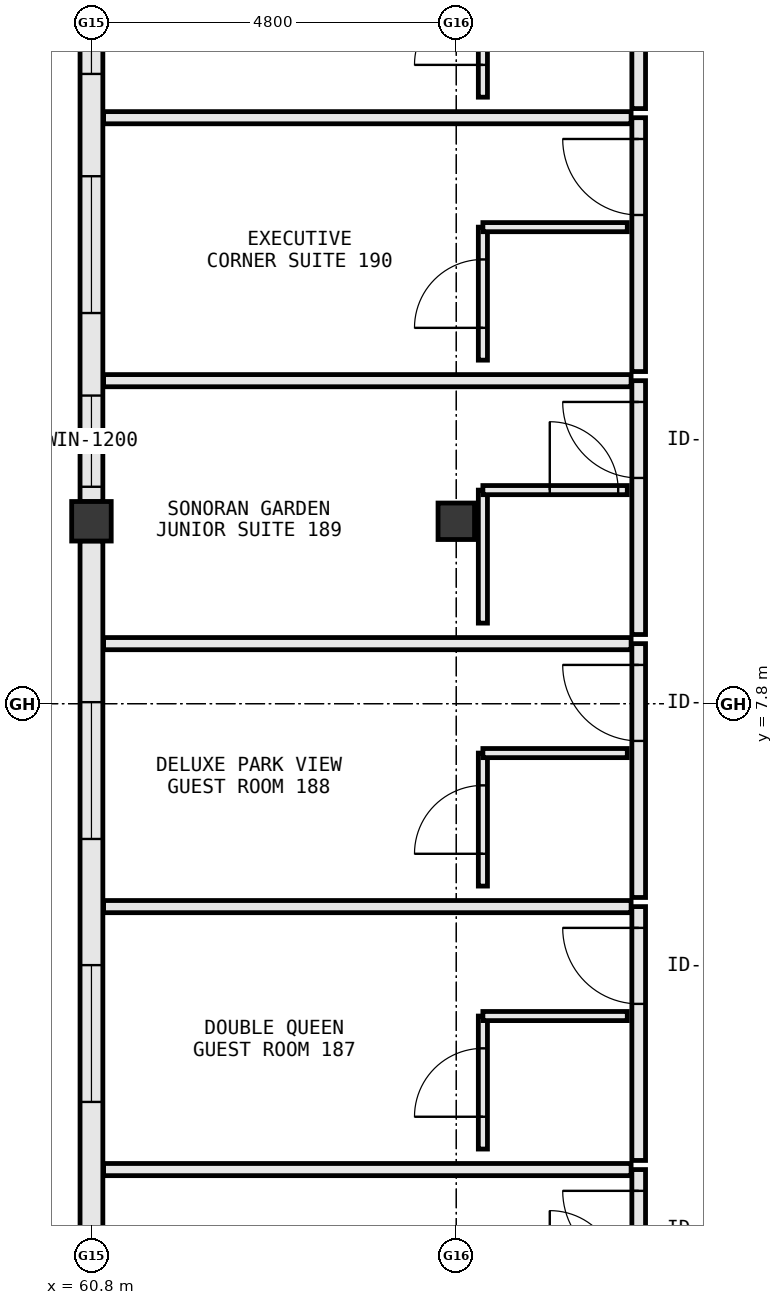
"""IFC4 building model, lengths in metres.
Left out: names, types, materials, properties, quantities, classifications, styles, units other than length and angle.
Written with IfcOpenShell. Run it as: python <this file> out.ifc"""

import sys

from ifc_helpers import new_model, si_unit, direction, frame, frame_2d, origin, origin_2d, place, context, subcontext, project, spatial, rectangle, extrude, element, fill, save


model = new_model("IFC4")
c1 = context("Model", 3, precision=1e-05, world=origin(), true_north=direction((0.0, 1.0)))
c2 = subcontext(c1, "Body", "Model", "MODEL_VIEW")
j1 = project(units=[si_unit("LENGTHUNIT", "METRE"), si_unit("PLANEANGLEUNIT", "RADIAN")], contexts=[c1])
p1 = place(None, origin())
s1 = spatial("IfcSite", under=j1, at=p1, CompositionType="ELEMENT")
p2 = place(p1, origin())
s2 = spatial("IfcBuilding", under=s1, at=p2, CompositionType="ELEMENT")
p3 = place(p2, frame((0.0, 0.0, 27.6)))
s3 = spatial("IfcBuildingStorey", under=s2, at=p3, CompositionType="ELEMENT", Elevation=27.6)
p4 = place(p3, frame((60.8, 10.2, 0.0), z_axis=(0.0, 0.0, 1.0), x_axis=(1.0, 0.0, 0.0)))
e1 = element("IfcColumn", 1, at=p4, inside=s3, PredefinedType="COLUMN", context=c2, shape_type="SweptSolid", body=[
    extrude(rectangle(XDim=0.52, YDim=0.52, at=origin_2d()), origin(), (0.0, 0.0, 1.0), 3.8),
])
p5 = place(p3, frame((65.6, 10.2, 0.0), z_axis=(0.0, 0.0, 1.0), x_axis=(1.0, 0.0, 0.0)))
e2 = element("IfcColumn", 2, at=p5, inside=s3, PredefinedType="COLUMN", context=c2, shape_type="SweptSolid", body=[
    extrude(rectangle(XDim=0.48, YDim=0.48, at=origin_2d()), origin(), (0.0, 0.0, 1.0), 3.8),
])
p6 = place(p3, frame((60.8, 18.342, 0.0), z_axis=(0.0, 0.0, 1.0), x_axis=(0.0, -1.0, 0.0)))
e3 = element("IfcWall", 3, at=p6, inside=s3, PredefinedType="STANDARD", context=c2, shape_type="SweptSolid", body=[
    extrude(rectangle(XDim=7.884, YDim=0.3, at=frame_2d((3.942, 0.0))), origin(), (0.0, 0.0, 1.0), 3.01),
])
p7 = place(p6, frame((6.488, 0.0, 0.85)))
e4 = element("IfcOpeningElement", 4, at=p7, cuts=e3, PredefinedType="OPENING", context=c2, shape_type="SweptSolid", body=[
    extrude(rectangle(XDim=1.2, YDim=1.55, at=frame_2d((0.6, 0.775))), frame((0.0, 0.162, 0.0), z_axis=(0.0, -1.0, 0.0), x_axis=(1.0, 0.0, 0.0)), (0.0, 0.0, 1.0), 0.324),
])
p8 = place(p6, frame((3.602, 0.0, 0.85)))
e5 = element("IfcOpeningElement", 5, at=p8, cuts=e3, PredefinedType="OPENING", context=c2, shape_type="SweptSolid", body=[
    extrude(rectangle(XDim=1.8, YDim=1.85, at=frame_2d((0.9, 0.925))), frame((0.0, 0.162, 0.0), z_axis=(0.0, -1.0, 0.0), x_axis=(1.0, 0.0, 0.0)), (0.0, 0.0, 1.0), 0.324),
])
p9 = place(p6, frame((0.456, 0.0, 0.85)))
e6 = element("IfcOpeningElement", 6, at=p9, cuts=e3, PredefinedType="OPENING", context=c2, shape_type="SweptSolid", body=[
    extrude(rectangle(XDim=1.8, YDim=1.85, at=frame_2d((0.9, 0.925))), frame((0.0, 0.162, 0.0), z_axis=(0.0, -1.0, 0.0), x_axis=(1.0, 0.0, 0.0)), (0.0, 0.0, 1.0), 0.324),
])
p10 = place(p3, frame((60.8, 9.942, 0.0), z_axis=(0.0, 0.0, 1.0), x_axis=(0.0, -1.0, 0.0)))
e7 = element("IfcWall", 7, at=p10, inside=s3, PredefinedType="STANDARD", context=c2, shape_type="SweptSolid", body=[
    extrude(rectangle(XDim=9.084, YDim=0.3, at=frame_2d((4.542, 0.0))), origin(), (0.0, 0.0, 1.0), 2.91),
])
p11 = place(p10, frame((5.582, 0.0, 0.85)))
e8 = element("IfcOpeningElement", 8, at=p11, cuts=e7, PredefinedType="OPENING", context=c2, shape_type="SweptSolid", body=[
    extrude(rectangle(XDim=1.8, YDim=1.85, at=frame_2d((0.9, 0.925))), frame((0.0, 0.162, 0.0), z_axis=(0.0, -1.0, 0.0), x_axis=(1.0, 0.0, 0.0)), (0.0, 0.0, 1.0), 0.324),
])
p12 = place(p10, frame((2.122, 0.0, 0.85)))
e9 = element("IfcOpeningElement", 9, at=p12, cuts=e7, PredefinedType="OPENING", context=c2, shape_type="SweptSolid", body=[
    extrude(rectangle(XDim=1.8, YDim=1.85, at=frame_2d((0.9, 0.925))), frame((0.0, 0.162, 0.0), z_axis=(0.0, -1.0, 0.0), x_axis=(1.0, 0.0, 0.0)), (0.0, 0.0, 1.0), 0.324),
])
p13 = place(p3, frame((68.0, -1.67, 0.0), z_axis=(0.0, 0.0, 1.0), x_axis=(0.0, 1.0, 0.0)))
e10 = element("IfcWall", 10, at=p13, inside=s3, PredefinedType="PARTITIONING", context=c2, shape_type="SweptSolid", body=[
    extrude(rectangle(XDim=3.34, YDim=0.18, at=frame_2d((1.67, 0.0))), origin(), (0.0, 0.0, 1.0), 3.555),
])
p14 = place(p13, frame((2.06, 0.0, 0.0)))
e11 = element("IfcOpeningElement", 11, at=p14, cuts=e10, PredefinedType="OPENING", context=c2, shape_type="SweptSolid", body=[
    extrude(rectangle(XDim=1.0, YDim=2.2, at=frame_2d((0.5, 1.1))), frame((0.0, 0.102, 0.0), z_axis=(0.0, -1.0, 0.0), x_axis=(1.0, 0.0, 0.0)), (0.0, 0.0, 1.0), 0.204),
])
p15 = place(p3, frame((60.96, 1.67, 0.0), z_axis=(0.0, 0.0, 1.0), x_axis=(1.0, 0.0, 0.0)))
e12 = element("IfcWall", 12, at=p15, inside=s3, PredefinedType="PARTITIONING", context=c2, shape_type="SweptSolid", body=[
    extrude(rectangle(XDim=6.94, YDim=0.16, at=frame_2d((3.47, 0.0))), origin(), (0.0, 0.0, 1.0), 3.555),
])
p16 = place(p3, frame((68.0, 1.79, 0.0), z_axis=(0.0, 0.0, 1.0), x_axis=(0.0, 1.0, 0.0)))
e13 = element("IfcWall", 13, at=p16, inside=s3, PredefinedType="PARTITIONING", context=c2, shape_type="SweptSolid", body=[
    extrude(rectangle(XDim=3.34, YDim=0.18, at=frame_2d((1.67, 0.0))), origin(), (0.0, 0.0, 1.0), 3.555),
])
p17 = place(p16, frame((2.06, 0.0, 0.0)))
e14 = element("IfcOpeningElement", 14, at=p17, cuts=e13, PredefinedType="OPENING", context=c2, shape_type="SweptSolid", body=[
    extrude(rectangle(XDim=1.0, YDim=2.2, at=frame_2d((0.5, 1.1))), frame((0.0, 0.102, 0.0), z_axis=(0.0, -1.0, 0.0), x_axis=(1.0, 0.0, 0.0)), (0.0, 0.0, 1.0), 0.204),
])
p18 = place(p3, frame((60.96, 5.13, 0.0), z_axis=(0.0, 0.0, 1.0), x_axis=(1.0, 0.0, 0.0)))
e15 = element("IfcWall", 15, at=p18, inside=s3, PredefinedType="PARTITIONING", context=c2, shape_type="SweptSolid", body=[
    extrude(rectangle(XDim=6.94, YDim=0.16, at=frame_2d((3.47, 0.0))), origin(), (0.0, 0.0, 1.0), 3.555),
])
p19 = place(p3, frame((65.95, 1.94, 0.0), z_axis=(0.0, 0.0, 1.0), x_axis=(0.0, 1.0, 0.0)))
e16 = element("IfcWall", 16, at=p19, inside=s3, PredefinedType="PARTITIONING", context=c2, shape_type="SweptSolid", body=[
    extrude(rectangle(XDim=1.75, YDim=0.12, at=frame_2d((0.875, 0.0))), origin(), (0.0, 0.0, 1.0), 2.91),
])
p20 = place(p19, frame((0.425, 0.0, 0.0)))
e17 = element("IfcOpeningElement", 17, at=p20, cuts=e16, PredefinedType="OPENING", context=c2, shape_type="SweptSolid", body=[
    extrude(rectangle(XDim=0.9, YDim=2.15, at=frame_2d((0.45, 1.075))), frame((0.0, 0.072, 0.0), z_axis=(0.0, -1.0, 0.0), x_axis=(1.0, 0.0, 0.0)), (0.0, 0.0, 1.0), 0.144),
])
p21 = place(p3, frame((65.95, 3.69, 0.0), z_axis=(0.0, 0.0, 1.0), x_axis=(1.0, 0.0, 0.0)))
e18 = element("IfcWall", 18, at=p21, inside=s3, PredefinedType="PARTITIONING", context=c2, shape_type="SweptSolid", body=[
    extrude(rectangle(XDim=1.9, YDim=0.12, at=frame_2d((0.95, 0.0))), origin(), (0.0, 0.0, 1.0), 3.555),
])
p22 = place(p3, frame((68.0, 5.25, 0.0), z_axis=(0.0, 0.0, 1.0), x_axis=(0.0, 1.0, 0.0)))
e19 = element("IfcWall", 19, at=p22, inside=s3, PredefinedType="PARTITIONING", context=c2, shape_type="SweptSolid", body=[
    extrude(rectangle(XDim=3.34, YDim=0.18, at=frame_2d((1.67, 0.0))), origin(), (0.0, 0.0, 1.0), 3.555),
])
p23 = place(p22, frame((2.06, 0.0, 0.0)))
e20 = element("IfcOpeningElement", 20, at=p23, cuts=e19, PredefinedType="OPENING", context=c2, shape_type="SweptSolid", body=[
    extrude(rectangle(XDim=1.0, YDim=2.2, at=frame_2d((0.5, 1.1))), frame((0.0, 0.102, 0.0), z_axis=(0.0, -1.0, 0.0), x_axis=(1.0, 0.0, 0.0)), (0.0, 0.0, 1.0), 0.204),
])
p24 = place(p3, frame((60.96, 8.59, 0.0), z_axis=(0.0, 0.0, 1.0), x_axis=(1.0, 0.0, 0.0)))
e21 = element("IfcWall", 21, at=p24, inside=s3, PredefinedType="PARTITIONING", context=c2, shape_type="SweptSolid", body=[
    extrude(rectangle(XDim=6.94, YDim=0.16, at=frame_2d((3.47, 0.0))), origin(), (0.0, 0.0, 1.0), 3.555),
])
p25 = place(p3, frame((65.95, 5.4, 0.0), z_axis=(0.0, 0.0, 1.0), x_axis=(0.0, 1.0, 0.0)))
e22 = element("IfcWall", 22, at=p25, inside=s3, PredefinedType="PARTITIONING", context=c2, shape_type="SweptSolid", body=[
    extrude(rectangle(XDim=1.75, YDim=0.12, at=frame_2d((0.875, 0.0))), origin(), (0.0, 0.0, 1.0), 2.91),
])
p26 = place(p25, frame((0.425, 0.0, 0.0)))
e23 = element("IfcOpeningElement", 23, at=p26, cuts=e22, PredefinedType="OPENING", context=c2, shape_type="SweptSolid", body=[
    extrude(rectangle(XDim=0.9, YDim=2.15, at=frame_2d((0.45, 1.075))), frame((0.0, 0.072, 0.0), z_axis=(0.0, -1.0, 0.0), x_axis=(1.0, 0.0, 0.0)), (0.0, 0.0, 1.0), 0.144),
])
p27 = place(p3, frame((65.95, 7.15, 0.0), z_axis=(0.0, 0.0, 1.0), x_axis=(1.0, 0.0, 0.0)))
e24 = element("IfcWall", 24, at=p27, inside=s3, PredefinedType="PARTITIONING", context=c2, shape_type="SweptSolid", body=[
    extrude(rectangle(XDim=1.9, YDim=0.12, at=frame_2d((0.95, 0.0))), origin(), (0.0, 0.0, 1.0), 3.555),
])
p28 = place(p3, frame((68.0, 8.71, 0.0), z_axis=(0.0, 0.0, 1.0), x_axis=(0.0, 1.0, 0.0)))
e25 = element("IfcWall", 25, at=p28, inside=s3, PredefinedType="PARTITIONING", context=c2, shape_type="SweptSolid", body=[
    extrude(rectangle(XDim=3.34, YDim=0.18, at=frame_2d((1.67, 0.0))), origin(), (0.0, 0.0, 1.0), 3.555),
])
p29 = place(p28, frame((2.06, 0.0, 0.0)))
e26 = element("IfcOpeningElement", 26, at=p29, cuts=e25, PredefinedType="OPENING", context=c2, shape_type="SweptSolid", body=[
    extrude(rectangle(XDim=1.0, YDim=2.2, at=frame_2d((0.5, 1.1))), frame((0.0, 0.102, 0.0), z_axis=(0.0, -1.0, 0.0), x_axis=(1.0, 0.0, 0.0)), (0.0, 0.0, 1.0), 0.204),
])
p30 = place(p3, frame((60.96, 12.05, 0.0), z_axis=(0.0, 0.0, 1.0), x_axis=(1.0, 0.0, 0.0)))
e27 = element("IfcWall", 27, at=p30, inside=s3, PredefinedType="PARTITIONING", context=c2, shape_type="SweptSolid", body=[
    extrude(rectangle(XDim=6.94, YDim=0.16, at=frame_2d((3.47, 0.0))), origin(), (0.0, 0.0, 1.0), 3.555),
])
p31 = place(p3, frame((65.95, 8.86, 0.0), z_axis=(0.0, 0.0, 1.0), x_axis=(0.0, 1.0, 0.0)))
e28 = element("IfcWall", 28, at=p31, inside=s3, PredefinedType="PARTITIONING", context=c2, shape_type="SweptSolid", body=[
    extrude(rectangle(XDim=1.75, YDim=0.12, at=frame_2d((0.875, 0.0))), origin(), (0.0, 0.0, 1.0), 2.91),
])
p32 = place(p3, frame((65.95, 10.61, 0.0), z_axis=(0.0, 0.0, 1.0), x_axis=(1.0, 0.0, 0.0)))
e29 = element("IfcWall", 29, at=p32, inside=s3, PredefinedType="PARTITIONING", context=c2, shape_type="SweptSolid", body=[
    extrude(rectangle(XDim=1.9, YDim=0.12, at=frame_2d((0.95, 0.0))), origin(), (0.0, 0.0, 1.0), 3.555),
])
p33 = place(p32, frame((0.88, 0.0, 0.0)))
e30 = element("IfcOpeningElement", 30, at=p33, cuts=e29, PredefinedType="OPENING", context=c2, shape_type="SweptSolid", body=[
    extrude(rectangle(XDim=0.9, YDim=2.15, at=frame_2d((0.45, 1.075))), frame((0.0, 0.072, 0.0), z_axis=(0.0, -1.0, 0.0), x_axis=(1.0, 0.0, 0.0)), (0.0, 0.0, 1.0), 0.144),
])
p34 = place(p3, frame((68.0, 12.17, 0.0), z_axis=(0.0, 0.0, 1.0), x_axis=(0.0, 1.0, 0.0)))
e31 = element("IfcWall", 31, at=p34, inside=s3, PredefinedType="PARTITIONING", context=c2, shape_type="SweptSolid", body=[
    extrude(rectangle(XDim=3.34, YDim=0.18, at=frame_2d((1.67, 0.0))), origin(), (0.0, 0.0, 1.0), 3.555),
])
p35 = place(p34, frame((2.06, 0.0, 0.0)))
e32 = element("IfcOpeningElement", 32, at=p35, cuts=e31, PredefinedType="OPENING", context=c2, shape_type="SweptSolid", body=[
    extrude(rectangle(XDim=1.0, YDim=2.2, at=frame_2d((0.5, 1.1))), frame((0.0, 0.102, 0.0), z_axis=(0.0, -1.0, 0.0), x_axis=(1.0, 0.0, 0.0)), (0.0, 0.0, 1.0), 0.204),
])
p36 = place(p3, frame((60.96, 15.51, 0.0), z_axis=(0.0, 0.0, 1.0), x_axis=(1.0, 0.0, 0.0)))
e33 = element("IfcWall", 33, at=p36, inside=s3, PredefinedType="PARTITIONING", context=c2, shape_type="SweptSolid", body=[
    extrude(rectangle(XDim=6.94, YDim=0.16, at=frame_2d((3.47, 0.0))), origin(), (0.0, 0.0, 1.0), 3.555),
])
p37 = place(p3, frame((65.95, 12.32, 0.0), z_axis=(0.0, 0.0, 1.0), x_axis=(0.0, 1.0, 0.0)))
e34 = element("IfcWall", 34, at=p37, inside=s3, PredefinedType="PARTITIONING", context=c2, shape_type="SweptSolid", body=[
    extrude(rectangle(XDim=1.75, YDim=0.12, at=frame_2d((0.875, 0.0))), origin(), (0.0, 0.0, 1.0), 3.01),
])
p38 = place(p37, frame((0.425, 0.0, 0.0)))
e35 = element("IfcOpeningElement", 35, at=p38, cuts=e34, PredefinedType="OPENING", context=c2, shape_type="SweptSolid", body=[
    extrude(rectangle(XDim=0.9, YDim=2.15, at=frame_2d((0.45, 1.075))), frame((0.0, 0.072, 0.0), z_axis=(0.0, -1.0, 0.0), x_axis=(1.0, 0.0, 0.0)), (0.0, 0.0, 1.0), 0.144),
])
p39 = place(p3, frame((65.95, 14.07, 0.0), z_axis=(0.0, 0.0, 1.0), x_axis=(1.0, 0.0, 0.0)))
e36 = element("IfcWall", 36, at=p39, inside=s3, PredefinedType="PARTITIONING", context=c2, shape_type="SweptSolid", body=[
    extrude(rectangle(XDim=1.9, YDim=0.12, at=frame_2d((0.95, 0.0))), origin(), (0.0, 0.0, 1.0), 3.555),
])
p40 = place(p3, frame((68.0, 15.63, 0.0), z_axis=(0.0, 0.0, 1.0), x_axis=(0.0, 1.0, 0.0)))
e37 = element("IfcWall", 37, at=p40, inside=s3, PredefinedType="PARTITIONING", context=c2, shape_type="SweptSolid", body=[
    extrude(rectangle(XDim=3.34, YDim=0.18, at=frame_2d((1.67, 0.0))), origin(), (0.0, 0.0, 1.0), 3.555),
])
p41 = place(p40, frame((2.06, 0.0, 0.0)))
e38 = element("IfcOpeningElement", 38, at=p41, cuts=e37, PredefinedType="OPENING", context=c2, shape_type="SweptSolid", body=[
    extrude(rectangle(XDim=1.0, YDim=2.2, at=frame_2d((0.5, 1.1))), frame((0.0, 0.102, 0.0), z_axis=(0.0, -1.0, 0.0), x_axis=(1.0, 0.0, 0.0)), (0.0, 0.0, 1.0), 0.204),
])
p42 = place(p3, frame((65.95, 15.78, 0.0), z_axis=(0.0, 0.0, 1.0), x_axis=(0.0, 1.0, 0.0)))
e39 = element("IfcWall", 39, at=p42, inside=s3, PredefinedType="PARTITIONING", context=c2, shape_type="SweptSolid", body=[
    extrude(rectangle(XDim=1.75, YDim=0.12, at=frame_2d((0.875, 0.0))), origin(), (0.0, 0.0, 1.0), 3.01),
])
p43 = place(p42, frame((0.425, 0.0, 0.0)))
e40 = element("IfcOpeningElement", 40, at=p43, cuts=e39, PredefinedType="OPENING", context=c2, shape_type="SweptSolid", body=[
    extrude(rectangle(XDim=0.9, YDim=2.15, at=frame_2d((0.45, 1.075))), frame((0.0, 0.072, 0.0), z_axis=(0.0, -1.0, 0.0), x_axis=(1.0, 0.0, 0.0)), (0.0, 0.0, 1.0), 0.144),
])
p44 = place(p11, origin())
e41 = element("IfcWindow", 41, at=p44, inside=s3, PartitioningType="SINGLE_PANEL", PredefinedType="WINDOW", context=c2, shape_type="SweptSolid", body=[
    extrude(rectangle(XDim=1.8, YDim=1.85, at=frame_2d((0.9, 0.925))), frame((0.0, 0.03, 0.0), z_axis=(0.0, -1.0, 0.0), x_axis=(1.0, 0.0, 0.0)), (0.0, 0.0, 1.0), 0.06),
])
fill(e8, e41)
p45 = place(p12, origin())
e42 = element("IfcWindow", 42, at=p45, inside=s3, PartitioningType="SINGLE_PANEL", PredefinedType="WINDOW", context=c2, shape_type="SweptSolid", body=[
    extrude(rectangle(XDim=1.8, YDim=1.85, at=frame_2d((0.9, 0.925))), frame((0.0, 0.03, 0.0), z_axis=(0.0, -1.0, 0.0), x_axis=(1.0, 0.0, 0.0)), (0.0, 0.0, 1.0), 0.06),
])
fill(e9, e42)
p46 = place(p7, origin())
e43 = element("IfcWindow", 43, at=p46, inside=s3, PartitioningType="SINGLE_PANEL", PredefinedType="WINDOW", context=c2, shape_type="SweptSolid", body=[
    extrude(rectangle(XDim=1.2, YDim=1.55, at=frame_2d((0.6, 0.775))), frame((0.0, 0.03, 0.0), z_axis=(0.0, -1.0, 0.0), x_axis=(1.0, 0.0, 0.0)), (0.0, 0.0, 1.0), 0.06),
])
fill(e4, e43)
p47 = place(p8, origin())
e44 = element("IfcWindow", 44, at=p47, inside=s3, PartitioningType="SINGLE_PANEL", PredefinedType="WINDOW", context=c2, shape_type="SweptSolid", body=[
    extrude(rectangle(XDim=1.8, YDim=1.85, at=frame_2d((0.9, 0.925))), frame((0.0, 0.03, 0.0), z_axis=(0.0, -1.0, 0.0), x_axis=(1.0, 0.0, 0.0)), (0.0, 0.0, 1.0), 0.06),
])
fill(e5, e44)
p48 = place(p9, origin())
e45 = element("IfcWindow", 45, at=p48, inside=s3, PartitioningType="SINGLE_PANEL", PredefinedType="WINDOW", context=c2, shape_type="SweptSolid", body=[
    extrude(rectangle(XDim=1.8, YDim=1.85, at=frame_2d((0.9, 0.925))), frame((0.0, 0.03, 0.0), z_axis=(0.0, -1.0, 0.0), x_axis=(1.0, 0.0, 0.0)), (0.0, 0.0, 1.0), 0.06),
])
fill(e6, e45)
p49 = place(p14, origin())
e46 = element("IfcDoor", 46, at=p49, inside=s3, OperationType="SINGLE_SWING_RIGHT", PredefinedType="DOOR", context=c2, shape_type="SweptSolid", body=[
    extrude(rectangle(XDim=1.0, YDim=2.2, at=frame_2d((0.5, 1.1))), frame((0.0, 0.025, 0.0), z_axis=(0.0, -1.0, 0.0), x_axis=(1.0, 0.0, 0.0)), (0.0, 0.0, 1.0), 0.05),
])
fill(e11, e46)
p50 = place(p17, origin())
e47 = element("IfcDoor", 47, at=p50, inside=s3, OperationType="SINGLE_SWING_RIGHT", PredefinedType="DOOR", context=c2, shape_type="SweptSolid", body=[
    extrude(rectangle(XDim=1.0, YDim=2.2, at=frame_2d((0.5, 1.1))), frame((0.0, 0.025, 0.0), z_axis=(0.0, -1.0, 0.0), x_axis=(1.0, 0.0, 0.0)), (0.0, 0.0, 1.0), 0.05),
])
fill(e14, e47)
p51 = place(p20, origin())
e48 = element("IfcDoor", 48, at=p51, inside=s3, OperationType="SINGLE_SWING_LEFT", PredefinedType="DOOR", context=c2, shape_type="SweptSolid", body=[
    extrude(rectangle(XDim=0.9, YDim=2.15, at=frame_2d((0.45, 1.075))), frame((0.0, 0.025, 0.0), z_axis=(0.0, -1.0, 0.0), x_axis=(1.0, 0.0, 0.0)), (0.0, 0.0, 1.0), 0.05),
])
fill(e17, e48)
p52 = place(p23, origin())
e49 = element("IfcDoor", 49, at=p52, inside=s3, OperationType="SINGLE_SWING_RIGHT", PredefinedType="DOOR", context=c2, shape_type="SweptSolid", body=[
    extrude(rectangle(XDim=1.0, YDim=2.2, at=frame_2d((0.5, 1.1))), frame((0.0, 0.025, 0.0), z_axis=(0.0, -1.0, 0.0), x_axis=(1.0, 0.0, 0.0)), (0.0, 0.0, 1.0), 0.05),
])
fill(e20, e49)
p53 = place(p26, origin())
e50 = element("IfcDoor", 50, at=p53, inside=s3, OperationType="SINGLE_SWING_LEFT", PredefinedType="DOOR", context=c2, shape_type="SweptSolid", body=[
    extrude(rectangle(XDim=0.9, YDim=2.15, at=frame_2d((0.45, 1.075))), frame((0.0, 0.025, 0.0), z_axis=(0.0, -1.0, 0.0), x_axis=(1.0, 0.0, 0.0)), (0.0, 0.0, 1.0), 0.05),
])
fill(e23, e50)
p54 = place(p29, origin())
e51 = element("IfcDoor", 51, at=p54, inside=s3, OperationType="SINGLE_SWING_RIGHT", PredefinedType="DOOR", context=c2, shape_type="SweptSolid", body=[
    extrude(rectangle(XDim=1.0, YDim=2.2, at=frame_2d((0.5, 1.1))), frame((0.0, 0.025, 0.0), z_axis=(0.0, -1.0, 0.0), x_axis=(1.0, 0.0, 0.0)), (0.0, 0.0, 1.0), 0.05),
])
fill(e26, e51)
p55 = place(p33, origin())
e52 = element("IfcDoor", 52, at=p55, inside=s3, OperationType="SINGLE_SWING_LEFT", PredefinedType="DOOR", context=c2, shape_type="SweptSolid", body=[
    extrude(rectangle(XDim=0.9, YDim=2.15, at=frame_2d((0.45, 1.075))), frame((0.0, 0.025, 0.0), z_axis=(0.0, -1.0, 0.0), x_axis=(1.0, 0.0, 0.0)), (0.0, 0.0, 1.0), 0.05),
])
fill(e30, e52)
p56 = place(p35, origin())
e53 = element("IfcDoor", 53, at=p56, inside=s3, OperationType="SINGLE_SWING_RIGHT", PredefinedType="DOOR", context=c2, shape_type="SweptSolid", body=[
    extrude(rectangle(XDim=1.0, YDim=2.2, at=frame_2d((0.5, 1.1))), frame((0.0, 0.025, 0.0), z_axis=(0.0, -1.0, 0.0), x_axis=(1.0, 0.0, 0.0)), (0.0, 0.0, 1.0), 0.05),
])
fill(e32, e53)
p57 = place(p38, origin())
e54 = element("IfcDoor", 54, at=p57, inside=s3, OperationType="SINGLE_SWING_LEFT", PredefinedType="DOOR", context=c2, shape_type="SweptSolid", body=[
    extrude(rectangle(XDim=0.9, YDim=2.15, at=frame_2d((0.45, 1.075))), frame((0.0, 0.025, 0.0), z_axis=(0.0, -1.0, 0.0), x_axis=(1.0, 0.0, 0.0)), (0.0, 0.0, 1.0), 0.05),
])
fill(e35, e54)
p58 = place(p43, origin())
e55 = element("IfcDoor", 55, at=p58, inside=s3, OperationType="SINGLE_SWING_LEFT", PredefinedType="DOOR", context=c2, shape_type="SweptSolid", body=[
    extrude(rectangle(XDim=0.9, YDim=2.15, at=frame_2d((0.45, 1.075))), frame((0.0, 0.025, 0.0), z_axis=(0.0, -1.0, 0.0), x_axis=(1.0, 0.0, 0.0)), (0.0, 0.0, 1.0), 0.05),
])
fill(e40, e55)
save(model, sys.argv[1])
